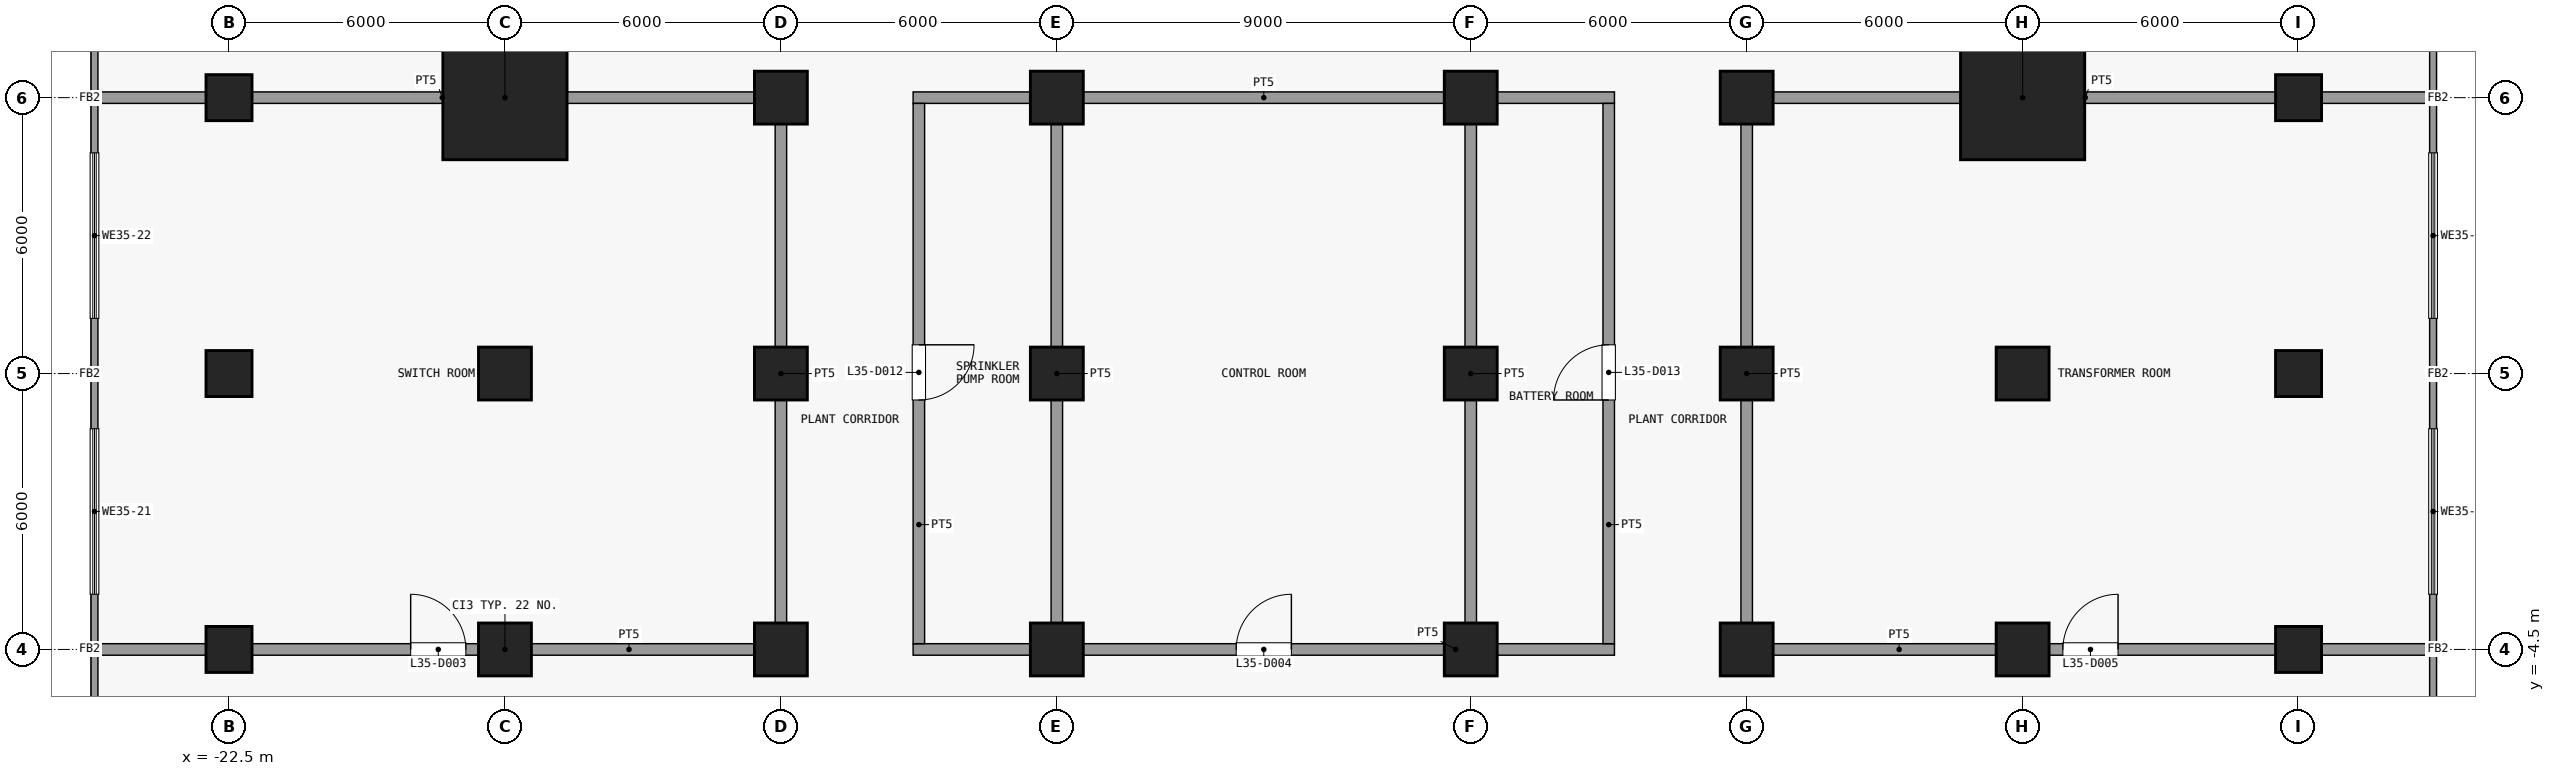
"""IFC4 building model, lengths in metres.
Left out: names, types, materials, properties, quantities, classifications, styles, units other than length and angle.
Written with IfcOpenShell. Run it as: python <this file> out.ifc"""

import sys

from ifc_helpers import new_model, si_unit, direction, frame, frame_2d, origin, origin_2d, place, context, subcontext, project, spatial, rectangle, extrude, element, fill, save


model = new_model("IFC4")
c1 = context("Model", 3, precision=1e-05, world=origin(), true_north=direction((0.0, 1.0)))
c2 = subcontext(c1, "Body", "Model", "MODEL_VIEW")
j1 = project(units=[si_unit("LENGTHUNIT", "METRE"), si_unit("PLANEANGLEUNIT", "RADIAN")], contexts=[c1])
p1 = place(None, origin())
s1 = spatial("IfcSite", under=j1, at=p1, CompositionType="ELEMENT")
p2 = place(p1, origin())
s2 = spatial("IfcBuilding", under=s1, at=p2, CompositionType="ELEMENT")
p3 = place(p2, frame((0.0, 0.0, 143.9)))
s3 = spatial("IfcBuildingStorey", under=s2, at=p3, CompositionType="ELEMENT", Elevation=143.9)
for number, where, z_axis, x_axis in (
    (1, (-22.5, -4.5, 0.0), (0.0, 0.0, 1.0), (1.0, 0.0, 0.0)),
    (2, (-22.5, 1.5, 0.0), (0.0, 0.0, 1.0), (1.0, 0.0, 0.0)),
    (3, (-22.5, 7.5, 0.0), (0.0, 0.0, 1.0), (1.0, 0.0, 0.0)),
):
    element("IfcColumn", number, at=place(p3, frame(where, z_axis=z_axis, x_axis=x_axis)), inside=s3, PredefinedType="COLUMN", context=c2, shape_type="SweptSolid", body=[
        extrude(rectangle(XDim=1.0, YDim=1.0, at=origin_2d()), origin(), (0.0, 0.0, 1.0), 5.4),
    ])
for number, where, z_axis, x_axis in (
    (4, (-16.5, -4.5, 0.0), (0.0, 0.0, 1.0), (1.0, 0.0, 0.0)),
    (5, (-16.5, 1.5, 0.0), (0.0, 0.0, 1.0), (1.0, 0.0, 0.0)),
):
    element("IfcColumn", number, at=place(p3, frame(where, z_axis=z_axis, x_axis=x_axis)), inside=s3, PredefinedType="COLUMN", context=c2, shape_type="SweptSolid", body=[
        extrude(rectangle(XDim=1.15, YDim=1.15, at=origin_2d()), origin(), (0.0, 0.0, 1.0), 5.4),
    ])
p4 = place(p3, frame((-16.5, 7.5, 0.0), z_axis=(0.0, 0.0, 1.0), x_axis=(1.0, 0.0, 0.0)))
e6 = element("IfcColumn", 6, at=p4, inside=s3, PredefinedType="COLUMN", context=c2, shape_type="SweptSolid", body=[
    extrude(rectangle(XDim=2.7, YDim=2.7, at=origin_2d()), origin(), (0.0, 0.0, 1.0), 5.4),
])
for number, where, z_axis, x_axis in (
    (7, (-10.5, -4.5, 0.0), (0.0, 0.0, 1.0), (1.0, 0.0, 0.0)),
    (8, (-10.5, 1.5, 0.0), (0.0, 0.0, 1.0), (1.0, 0.0, 0.0)),
    (9, (-10.5, 7.5, 0.0), (0.0, 0.0, 1.0), (1.0, 0.0, 0.0)),
    (10, (-4.5, -4.5, 0.0), (0.0, 0.0, 1.0), (1.0, 0.0, 0.0)),
    (11, (-4.5, 1.5, 0.0), (0.0, 0.0, 1.0), (1.0, 0.0, 0.0)),
    (12, (-4.5, 7.5, 0.0), (0.0, 0.0, 1.0), (1.0, 0.0, 0.0)),
    (13, (4.5, -4.5, 0.0), (0.0, 0.0, 1.0), (1.0, 0.0, 0.0)),
    (14, (4.5, 1.5, 0.0), (0.0, 0.0, 1.0), (1.0, 0.0, 0.0)),
    (15, (4.5, 7.5, 0.0), (0.0, 0.0, 1.0), (1.0, 0.0, 0.0)),
    (16, (10.5, -4.5, 0.0), (0.0, 0.0, 1.0), (1.0, 0.0, 0.0)),
    (17, (10.5, 1.5, 0.0), (0.0, 0.0, 1.0), (1.0, 0.0, 0.0)),
    (18, (10.5, 7.5, 0.0), (0.0, 0.0, 1.0), (1.0, 0.0, 0.0)),
    (19, (16.5, -4.5, 0.0), (0.0, 0.0, 1.0), (1.0, 0.0, 0.0)),
    (20, (16.5, 1.5, 0.0), (0.0, 0.0, 1.0), (1.0, 0.0, 0.0)),
):
    element("IfcColumn", number, at=place(p3, frame(where, z_axis=z_axis, x_axis=x_axis)), inside=s3, PredefinedType="COLUMN", context=c2, shape_type="SweptSolid", body=[
        extrude(rectangle(XDim=1.15, YDim=1.15, at=origin_2d()), origin(), (0.0, 0.0, 1.0), 5.4),
    ])
p5 = place(p3, frame((16.5, 7.5, 0.0), z_axis=(0.0, 0.0, 1.0), x_axis=(1.0, 0.0, 0.0)))
e21 = element("IfcColumn", 21, at=p5, inside=s3, PredefinedType="COLUMN", context=c2, shape_type="SweptSolid", body=[
    extrude(rectangle(XDim=2.7, YDim=2.7, at=origin_2d()), origin(), (0.0, 0.0, 1.0), 5.4),
])
for number, where, z_axis, x_axis in (
    (22, (22.5, -4.5, 0.0), (0.0, 0.0, 1.0), (1.0, 0.0, 0.0)),
    (23, (22.5, 1.5, 0.0), (0.0, 0.0, 1.0), (1.0, 0.0, 0.0)),
    (24, (22.5, 7.5, 0.0), (0.0, 0.0, 1.0), (1.0, 0.0, 0.0)),
):
    element("IfcColumn", number, at=place(p3, frame(where, z_axis=z_axis, x_axis=x_axis)), inside=s3, PredefinedType="COLUMN", context=c2, shape_type="SweptSolid", body=[
        extrude(rectangle(XDim=1.0, YDim=1.0, at=origin_2d()), origin(), (0.0, 0.0, 1.0), 5.4),
    ])
p6 = place(p3, frame((25.425, 18.85, 0.0), z_axis=(0.0, 0.0, 1.0), x_axis=(0.0, -1.0, 0.0)))
e25 = element("IfcWall", 25, at=p6, inside=s3, PredefinedType="SOLIDWALL", context=c2, shape_type="SweptSolid", body=[
    extrude(rectangle(XDim=40.7, YDim=0.15, at=frame_2d((20.35, 0.0))), origin(), (0.0, 0.0, 1.0), 5.0),
])
p7 = place(p6, frame((34.725, 0.0, 1.2)))
e26 = element("IfcOpeningElement", 26, at=p7, cuts=e25, PredefinedType="OPENING", context=c2, shape_type="SweptSolid", body=[
    extrude(rectangle(XDim=3.6, YDim=3.0, at=frame_2d((1.8, 1.5))), frame((0.0, 0.085, 0.0), z_axis=(0.0, -1.0, 0.0), x_axis=(1.0, 0.0, 0.0)), (0.0, 0.0, 1.0), 0.17),
])
p8 = place(p6, frame((27.025, 0.0, 1.2)))
e27 = element("IfcOpeningElement", 27, at=p8, cuts=e25, PredefinedType="OPENING", context=c2, shape_type="SweptSolid", body=[
    extrude(rectangle(XDim=2.625, YDim=3.0, at=frame_2d((1.312, 1.5))), frame((0.0, 0.085, 0.0), z_axis=(0.0, -1.0, 0.0), x_axis=(1.0, 0.0, 0.0)), (0.0, 0.0, 1.0), 0.17),
])
p9 = place(p6, frame((18.55, 0.0, 1.2)))
e28 = element("IfcOpeningElement", 28, at=p9, cuts=e25, PredefinedType="OPENING", context=c2, shape_type="SweptSolid", body=[
    extrude(rectangle(XDim=3.6, YDim=3.0, at=frame_2d((1.8, 1.5))), frame((0.0, 0.085, 0.0), z_axis=(0.0, -1.0, 0.0), x_axis=(1.0, 0.0, 0.0)), (0.0, 0.0, 1.0), 0.17),
])
p10 = place(p6, frame((12.55, 0.0, 1.2)))
e29 = element("IfcOpeningElement", 29, at=p10, cuts=e25, PredefinedType="OPENING", context=c2, shape_type="SweptSolid", body=[
    extrude(rectangle(XDim=3.6, YDim=3.0, at=frame_2d((1.8, 1.5))), frame((0.0, 0.085, 0.0), z_axis=(0.0, -1.0, 0.0), x_axis=(1.0, 0.0, 0.0)), (0.0, 0.0, 1.0), 0.17),
])
p11 = place(p6, frame((8.625, 0.0, 1.2)))
e30 = element("IfcOpeningElement", 30, at=p11, cuts=e25, PredefinedType="OPENING", context=c2, shape_type="SweptSolid", body=[
    extrude(rectangle(XDim=1.525, YDim=3.0, at=frame_2d((0.762, 1.5))), frame((0.0, 0.085, 0.0), z_axis=(0.0, -1.0, 0.0), x_axis=(1.0, 0.0, 0.0)), (0.0, 0.0, 1.0), 0.17),
])
p12 = place(p6, frame((6.55, 0.0, 1.2)))
e31 = element("IfcOpeningElement", 31, at=p12, cuts=e25, PredefinedType="OPENING", context=c2, shape_type="SweptSolid", body=[
    extrude(rectangle(XDim=1.525, YDim=3.0, at=frame_2d((0.762, 1.5))), frame((0.0, 0.085, 0.0), z_axis=(0.0, -1.0, 0.0), x_axis=(1.0, 0.0, 0.0)), (0.0, 0.0, 1.0), 0.17),
])
p13 = place(p6, frame((0.875, 0.0, 1.2)))
e32 = element("IfcOpeningElement", 32, at=p13, cuts=e25, PredefinedType="OPENING", context=c2, shape_type="SweptSolid", body=[
    extrude(rectangle(XDim=3.6, YDim=3.0, at=frame_2d((1.8, 1.5))), frame((0.0, 0.085, 0.0), z_axis=(0.0, -1.0, 0.0), x_axis=(1.0, 0.0, 0.0)), (0.0, 0.0, 1.0), 0.17),
])
p14 = place(p3, frame((-25.425, -21.85, 0.0), z_axis=(0.0, 0.0, 1.0), x_axis=(0.0, 1.0, 0.0)))
e33 = element("IfcWall", 33, at=p14, inside=s3, PredefinedType="SOLIDWALL", context=c2, shape_type="SweptSolid", body=[
    extrude(rectangle(XDim=40.7, YDim=0.15, at=frame_2d((20.35, 0.0))), origin(), (0.0, 0.0, 1.0), 5.0),
])
p15 = place(p14, frame((2.375, 0.0, 1.2)))
e34 = element("IfcOpeningElement", 34, at=p15, cuts=e33, PredefinedType="OPENING", context=c2, shape_type="SweptSolid", body=[
    extrude(rectangle(XDim=3.6, YDim=3.0, at=frame_2d((1.8, 1.5))), frame((0.0, 0.085, 0.0), z_axis=(0.0, -1.0, 0.0), x_axis=(1.0, 0.0, 0.0)), (0.0, 0.0, 1.0), 0.17),
])
p16 = place(p14, frame((11.05, 0.0, 1.2)))
e35 = element("IfcOpeningElement", 35, at=p16, cuts=e33, PredefinedType="OPENING", context=c2, shape_type="SweptSolid", body=[
    extrude(rectangle(XDim=2.625, YDim=3.0, at=frame_2d((1.312, 1.5))), frame((0.0, 0.085, 0.0), z_axis=(0.0, -1.0, 0.0), x_axis=(1.0, 0.0, 0.0)), (0.0, 0.0, 1.0), 0.17),
])
p17 = place(p14, frame((18.55, 0.0, 1.2)))
e36 = element("IfcOpeningElement", 36, at=p17, cuts=e33, PredefinedType="OPENING", context=c2, shape_type="SweptSolid", body=[
    extrude(rectangle(XDim=3.6, YDim=3.0, at=frame_2d((1.8, 1.5))), frame((0.0, 0.085, 0.0), z_axis=(0.0, -1.0, 0.0), x_axis=(1.0, 0.0, 0.0)), (0.0, 0.0, 1.0), 0.17),
])
p18 = place(p14, frame((24.55, 0.0, 1.2)))
e37 = element("IfcOpeningElement", 37, at=p18, cuts=e33, PredefinedType="OPENING", context=c2, shape_type="SweptSolid", body=[
    extrude(rectangle(XDim=3.6, YDim=3.0, at=frame_2d((1.8, 1.5))), frame((0.0, 0.085, 0.0), z_axis=(0.0, -1.0, 0.0), x_axis=(1.0, 0.0, 0.0)), (0.0, 0.0, 1.0), 0.17),
])
p19 = place(p14, frame((30.55, 0.0, 1.2)))
e38 = element("IfcOpeningElement", 38, at=p19, cuts=e33, PredefinedType="OPENING", context=c2, shape_type="SweptSolid", body=[
    extrude(rectangle(XDim=1.525, YDim=3.0, at=frame_2d((0.762, 1.5))), frame((0.0, 0.085, 0.0), z_axis=(0.0, -1.0, 0.0), x_axis=(1.0, 0.0, 0.0)), (0.0, 0.0, 1.0), 0.17),
])
p20 = place(p14, frame((32.625, 0.0, 1.2)))
e39 = element("IfcOpeningElement", 39, at=p20, cuts=e33, PredefinedType="OPENING", context=c2, shape_type="SweptSolid", body=[
    extrude(rectangle(XDim=1.525, YDim=3.0, at=frame_2d((0.762, 1.5))), frame((0.0, 0.085, 0.0), z_axis=(0.0, -1.0, 0.0), x_axis=(1.0, 0.0, 0.0)), (0.0, 0.0, 1.0), 0.17),
])
p21 = place(p14, frame((36.225, 0.0, 1.2)))
e40 = element("IfcOpeningElement", 40, at=p21, cuts=e33, PredefinedType="OPENING", context=c2, shape_type="SweptSolid", body=[
    extrude(rectangle(XDim=3.6, YDim=3.0, at=frame_2d((1.8, 1.5))), frame((0.0, 0.085, 0.0), z_axis=(0.0, -1.0, 0.0), x_axis=(1.0, 0.0, 0.0)), (0.0, 0.0, 1.0), 0.17),
])
p22 = place(p3, frame((-25.35, -4.5, 0.0), z_axis=(0.0, 0.0, 1.0), x_axis=(1.0, 0.0, 0.0)))
e41 = element("IfcWall", 41, at=p22, inside=s3, PredefinedType="PARTITIONING", context=c2, shape_type="SweptSolid", body=[
    extrude(rectangle(XDim=14.975, YDim=0.25, at=frame_2d((7.488, 0.0))), origin(), (0.0, 0.0, 1.0), 5.0),
])
p23 = place(p22, frame((6.8, 0.0, 0.0)))
e42 = element("IfcOpeningElement", 42, at=p23, cuts=e41, PredefinedType="OPENING", context=c2, shape_type="SweptSolid", body=[
    extrude(rectangle(XDim=1.2, YDim=2.1, at=frame_2d((0.6, 1.05))), frame((0.0, 0.135, 0.0), z_axis=(0.0, -1.0, 0.0), x_axis=(1.0, 0.0, 0.0)), (0.0, 0.0, 1.0), 0.27),
])
p24 = place(p3, frame((-7.625, -4.5, 0.0), z_axis=(0.0, 0.0, 1.0), x_axis=(1.0, 0.0, 0.0)))
e43 = element("IfcWall", 43, at=p24, inside=s3, PredefinedType="PARTITIONING", context=c2, shape_type="SweptSolid", body=[
    extrude(rectangle(XDim=15.25, YDim=0.25, at=frame_2d((7.625, 0.0))), origin(), (0.0, 0.0, 1.0), 5.0),
])
p25 = place(p24, frame((7.025, 0.0, 0.0)))
e44 = element("IfcOpeningElement", 44, at=p25, cuts=e43, PredefinedType="OPENING", context=c2, shape_type="SweptSolid", body=[
    extrude(rectangle(XDim=1.2, YDim=2.1, at=frame_2d((0.6, 1.05))), frame((0.0, 0.135, 0.0), z_axis=(0.0, -1.0, 0.0), x_axis=(1.0, 0.0, 0.0)), (0.0, 0.0, 1.0), 0.27),
])
p26 = place(p3, frame((10.375, -4.5, 0.0), z_axis=(0.0, 0.0, 1.0), x_axis=(1.0, 0.0, 0.0)))
e45 = element("IfcWall", 45, at=p26, inside=s3, PredefinedType="PARTITIONING", context=c2, shape_type="SweptSolid", body=[
    extrude(rectangle(XDim=14.975, YDim=0.25, at=frame_2d((7.488, 0.0))), origin(), (0.0, 0.0, 1.0), 5.0),
])
p27 = place(p26, frame((7.0, 0.0, 0.0)))
e46 = element("IfcOpeningElement", 46, at=p27, cuts=e45, PredefinedType="OPENING", context=c2, shape_type="SweptSolid", body=[
    extrude(rectangle(XDim=1.2, YDim=2.1, at=frame_2d((0.6, 1.05))), frame((0.0, 0.135, 0.0), z_axis=(0.0, -1.0, 0.0), x_axis=(1.0, 0.0, 0.0)), (0.0, 0.0, 1.0), 0.27),
])
p28 = place(p3, frame((-25.35, 7.5, 0.0), z_axis=(0.0, 0.0, 1.0), x_axis=(1.0, 0.0, 0.0)))
e47 = element("IfcWall", 47, at=p28, inside=s3, PredefinedType="PARTITIONING", context=c2, shape_type="SweptSolid", body=[
    extrude(rectangle(XDim=14.975, YDim=0.25, at=frame_2d((7.488, 0.0))), origin(), (0.0, 0.0, 1.0), 5.0),
])
p29 = place(p3, frame((-7.625, 7.5, 0.0), z_axis=(0.0, 0.0, 1.0), x_axis=(1.0, 0.0, 0.0)))
e48 = element("IfcWall", 48, at=p29, inside=s3, PredefinedType="PARTITIONING", context=c2, shape_type="SweptSolid", body=[
    extrude(rectangle(XDim=15.25, YDim=0.25, at=frame_2d((7.625, 0.0))), origin(), (0.0, 0.0, 1.0), 5.0),
])
p30 = place(p3, frame((10.375, 7.5, 0.0), z_axis=(0.0, 0.0, 1.0), x_axis=(1.0, 0.0, 0.0)))
e49 = element("IfcWall", 49, at=p30, inside=s3, PredefinedType="PARTITIONING", context=c2, shape_type="SweptSolid", body=[
    extrude(rectangle(XDim=14.975, YDim=0.25, at=frame_2d((7.488, 0.0))), origin(), (0.0, 0.0, 1.0), 5.0),
])
p31 = place(p3, frame((-10.5, -4.375, 0.0), z_axis=(0.0, 0.0, 1.0), x_axis=(0.0, 1.0, 0.0)))
e50 = element("IfcWall", 50, at=p31, inside=s3, PredefinedType="PARTITIONING", context=c2, shape_type="SweptSolid", body=[
    extrude(rectangle(XDim=11.75, YDim=0.25, at=frame_2d((5.875, 0.0))), origin(), (0.0, 0.0, 1.0), 5.0),
])
p32 = place(p3, frame((-7.5, -4.375, 0.0), z_axis=(0.0, 0.0, 1.0), x_axis=(0.0, 1.0, 0.0)))
e51 = element("IfcWall", 51, at=p32, inside=s3, PredefinedType="PARTITIONING", context=c2, shape_type="SweptSolid", body=[
    extrude(rectangle(XDim=11.75, YDim=0.25, at=frame_2d((5.875, 0.0))), origin(), (0.0, 0.0, 1.0), 5.0),
])
p33 = place(p32, frame((5.3, 0.0, 0.0)))
e52 = element("IfcOpeningElement", 52, at=p33, cuts=e51, PredefinedType="OPENING", context=c2, shape_type="SweptSolid", body=[
    extrude(rectangle(XDim=1.2, YDim=2.1, at=frame_2d((0.6, 1.05))), frame((0.0, 0.135, 0.0), z_axis=(0.0, -1.0, 0.0), x_axis=(1.0, 0.0, 0.0)), (0.0, 0.0, 1.0), 0.27),
])
for number, where, z_axis, x_axis in (
    (53, (-4.5, -4.375, 0.0), (0.0, 0.0, 1.0), (0.0, 1.0, 0.0)),
    (54, (4.5, -4.375, 0.0), (0.0, 0.0, 1.0), (0.0, 1.0, 0.0)),
):
    element("IfcWall", number, at=place(p3, frame(where, z_axis=z_axis, x_axis=x_axis)), inside=s3, PredefinedType="PARTITIONING", context=c2, shape_type="SweptSolid", body=[
        extrude(rectangle(XDim=11.75, YDim=0.25, at=frame_2d((5.875, 0.0))), origin(), (0.0, 0.0, 1.0), 5.0),
    ])
p34 = place(p3, frame((7.5, -4.375, 0.0), z_axis=(0.0, 0.0, 1.0), x_axis=(0.0, 1.0, 0.0)))
e55 = element("IfcWall", 55, at=p34, inside=s3, PredefinedType="PARTITIONING", context=c2, shape_type="SweptSolid", body=[
    extrude(rectangle(XDim=11.75, YDim=0.25, at=frame_2d((5.875, 0.0))), origin(), (0.0, 0.0, 1.0), 5.0),
])
p35 = place(p34, frame((5.3, 0.0, 0.0)))
e56 = element("IfcOpeningElement", 56, at=p35, cuts=e55, PredefinedType="OPENING", context=c2, shape_type="SweptSolid", body=[
    extrude(rectangle(XDim=1.2, YDim=2.1, at=frame_2d((0.6, 1.05))), frame((0.0, 0.135, 0.0), z_axis=(0.0, -1.0, 0.0), x_axis=(1.0, 0.0, 0.0)), (0.0, 0.0, 1.0), 0.27),
])
p36 = place(p3, frame((10.5, -4.375, 0.0), z_axis=(0.0, 0.0, 1.0), x_axis=(0.0, 1.0, 0.0)))
e57 = element("IfcWall", 57, at=p36, inside=s3, PredefinedType="PARTITIONING", context=c2, shape_type="SweptSolid", body=[
    extrude(rectangle(XDim=11.75, YDim=0.25, at=frame_2d((5.875, 0.0))), origin(), (0.0, 0.0, 1.0), 5.0),
])
p37 = place(p9, origin())
e58 = element("IfcWindow", 58, at=p37, inside=s3, PartitioningType="SINGLE_PANEL", PredefinedType="WINDOW", context=c2, shape_type="SweptSolid", body=[
    extrude(rectangle(XDim=3.6, YDim=3.0, at=frame_2d((1.8, 1.5))), frame((0.0, 0.03, 0.0), z_axis=(0.0, -1.0, 0.0), x_axis=(1.0, 0.0, 0.0)), (0.0, 0.0, 1.0), 0.06),
])
fill(e28, e58)
p38 = place(p10, origin())
e59 = element("IfcWindow", 59, at=p38, inside=s3, PartitioningType="SINGLE_PANEL", PredefinedType="WINDOW", context=c2, shape_type="SweptSolid", body=[
    extrude(rectangle(XDim=3.6, YDim=3.0, at=frame_2d((1.8, 1.5))), frame((0.0, 0.03, 0.0), z_axis=(0.0, -1.0, 0.0), x_axis=(1.0, 0.0, 0.0)), (0.0, 0.0, 1.0), 0.06),
])
fill(e29, e59)
p39 = place(p17, origin())
e60 = element("IfcWindow", 60, at=p39, inside=s3, PartitioningType="SINGLE_PANEL", PredefinedType="WINDOW", context=c2, shape_type="SweptSolid", body=[
    extrude(rectangle(XDim=3.6, YDim=3.0, at=frame_2d((1.8, 1.5))), frame((0.0, 0.03, 0.0), z_axis=(0.0, -1.0, 0.0), x_axis=(1.0, 0.0, 0.0)), (0.0, 0.0, 1.0), 0.06),
])
fill(e36, e60)
p40 = place(p18, origin())
e61 = element("IfcWindow", 61, at=p40, inside=s3, PartitioningType="SINGLE_PANEL", PredefinedType="WINDOW", context=c2, shape_type="SweptSolid", body=[
    extrude(rectangle(XDim=3.6, YDim=3.0, at=frame_2d((1.8, 1.5))), frame((0.0, 0.03, 0.0), z_axis=(0.0, -1.0, 0.0), x_axis=(1.0, 0.0, 0.0)), (0.0, 0.0, 1.0), 0.06),
])
fill(e37, e61)
p41 = place(p23, origin())
e62 = element("IfcDoor", 62, at=p41, inside=s3, OperationType="SINGLE_SWING_RIGHT", PredefinedType="DOOR", context=c2, shape_type="SweptSolid", body=[
    extrude(rectangle(XDim=1.2, YDim=2.1, at=frame_2d((0.6, 1.05))), frame((0.0, 0.025, 0.0), z_axis=(0.0, -1.0, 0.0), x_axis=(1.0, 0.0, 0.0)), (0.0, 0.0, 1.0), 0.05),
])
fill(e42, e62)
p42 = place(p25, origin())
e63 = element("IfcDoor", 63, at=p42, inside=s3, OperationType="SINGLE_SWING_LEFT", PredefinedType="DOOR", context=c2, shape_type="SweptSolid", body=[
    extrude(rectangle(XDim=1.2, YDim=2.1, at=frame_2d((0.6, 1.05))), frame((0.0, 0.025, 0.0), z_axis=(0.0, -1.0, 0.0), x_axis=(1.0, 0.0, 0.0)), (0.0, 0.0, 1.0), 0.05),
])
fill(e44, e63)
p43 = place(p27, origin())
e64 = element("IfcDoor", 64, at=p43, inside=s3, OperationType="SINGLE_SWING_LEFT", PredefinedType="DOOR", context=c2, shape_type="SweptSolid", body=[
    extrude(rectangle(XDim=1.2, YDim=2.1, at=frame_2d((0.6, 1.05))), frame((0.0, 0.025, 0.0), z_axis=(0.0, -1.0, 0.0), x_axis=(1.0, 0.0, 0.0)), (0.0, 0.0, 1.0), 0.05),
])
fill(e46, e64)
p44 = place(p33, origin())
e65 = element("IfcDoor", 65, at=p44, inside=s3, OperationType="SINGLE_SWING_RIGHT", PredefinedType="DOOR", context=c2, shape_type="SweptSolid", body=[
    extrude(rectangle(XDim=1.2, YDim=2.1, at=frame_2d((0.6, 1.05))), frame((0.0, 0.025, 0.0), z_axis=(0.0, -1.0, 0.0), x_axis=(1.0, 0.0, 0.0)), (0.0, 0.0, 1.0), 0.05),
])
fill(e52, e65)
p45 = place(p35, origin())
e66 = element("IfcDoor", 66, at=p45, inside=s3, OperationType="SINGLE_SWING_RIGHT", PredefinedType="DOOR", context=c2, shape_type="SweptSolid", body=[
    extrude(rectangle(XDim=1.2, YDim=2.1, at=frame_2d((0.6, 1.05))), frame((0.0, 0.025, 0.0), z_axis=(0.0, -1.0, 0.0), x_axis=(1.0, 0.0, 0.0)), (0.0, 0.0, 1.0), 0.05),
])
fill(e56, e66)
save(model, sys.argv[1])
